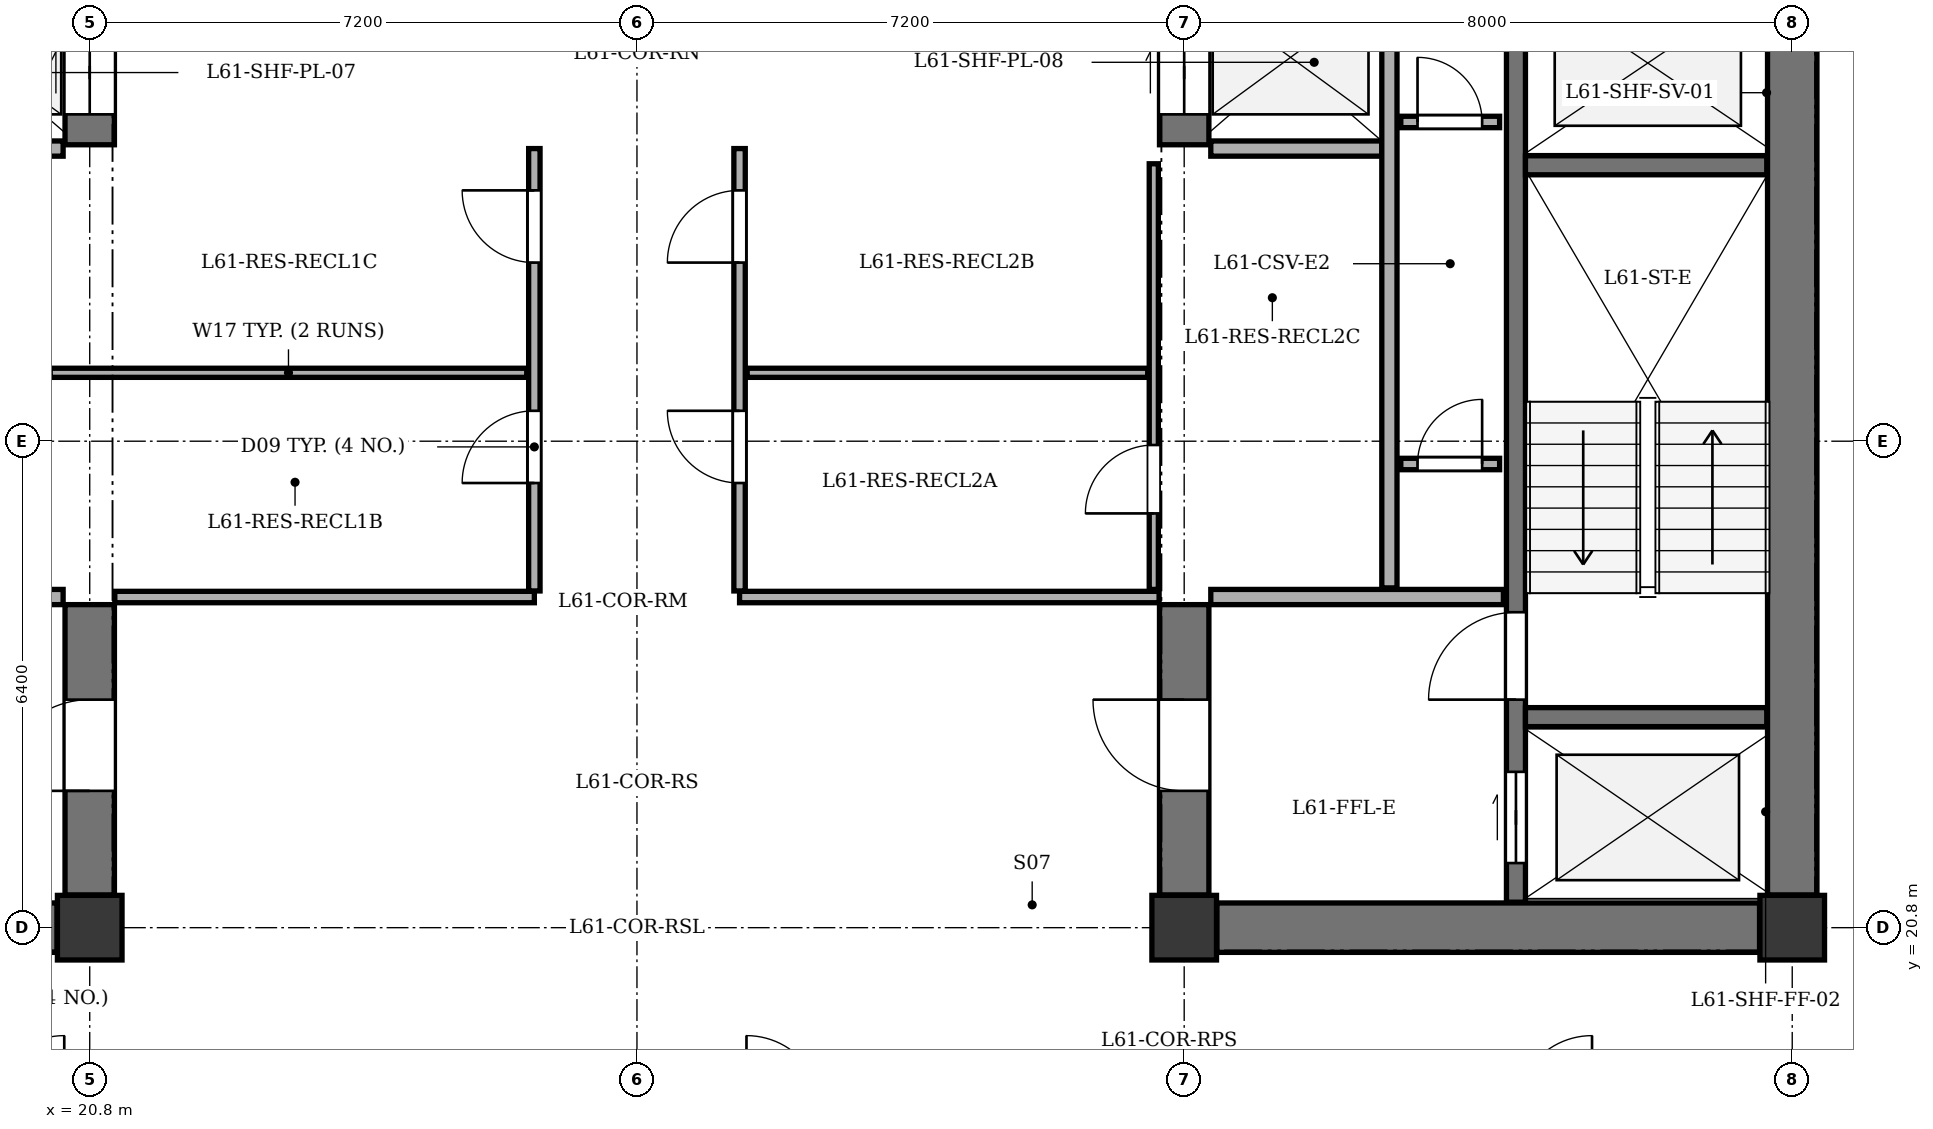
"""IFC4 building model, lengths in metres.
Left out: names, types, materials, properties, quantities, classifications, styles, units other than length and angle.
Written with IfcOpenShell. Run it as: python <this file> out.ifc"""

import sys

from ifc_helpers import new_model, si_unit, direction, frame, frame_2d, origin, origin_2d, place, context, subcontext, project, spatial, rectangle, extrude, element, fill, save


model = new_model("IFC4")
c1 = context("Model", 3, precision=1e-05, world=origin(), true_north=direction((0.0, 1.0)))
c2 = subcontext(c1, "Body", "Model", "MODEL_VIEW")
j1 = project(units=[si_unit("LENGTHUNIT", "METRE"), si_unit("PLANEANGLEUNIT", "RADIAN")], contexts=[c1])
p1 = place(None, origin())
s1 = spatial("IfcSite", under=j1, at=p1, CompositionType="ELEMENT")
p2 = place(p1, origin())
s2 = spatial("IfcBuilding", under=s1, at=p2, CompositionType="ELEMENT")
p3 = place(p2, frame((0.0, 0.0, 234.7)))
s3 = spatial("IfcBuildingStorey", under=s2, at=p3, CompositionType="ELEMENT", Elevation=234.7)
for number, where, z_axis, x_axis in (
    (1, (20.8, 20.8, 0.0), (0.0, 0.0, 1.0), (1.0, 0.0, 0.0)),
    (2, (35.2, 20.8, 0.0), (0.0, 0.0, 1.0), (1.0, 0.0, 0.0)),
    (3, (43.2, 20.8, 0.0), (0.0, 0.0, 1.0), (1.0, 0.0, 0.0)),
):
    element("IfcColumn", number, at=place(p3, frame(where, z_axis=z_axis, x_axis=x_axis)), inside=s3, PredefinedType="COLUMN", context=c2, shape_type="SweptSolid", body=[
        extrude(rectangle(XDim=0.85, YDim=0.85, at=origin_2d()), origin(), (0.0, 0.0, 1.0), 3.4),
    ])
p4 = place(p3, frame((13.23, 20.8, 0.0), z_axis=(0.0, 0.0, 1.0), x_axis=(1.0, 0.0, 0.0)))
e4 = element("IfcWall", 4, at=p4, inside=s3, PredefinedType="SHEAR", context=c2, shape_type="SweptSolid", body=[
    extrude(rectangle(XDim=7.14, YDim=0.65, at=frame_2d((3.57, 0.0))), origin(), (0.0, 0.0, 1.0), 3.1),
])
p5 = place(p3, frame((20.8, 21.23, 0.0), z_axis=(0.0, 0.0, 1.0), x_axis=(0.0, 1.0, 0.0)))
e5 = element("IfcWall", 5, at=p5, inside=s3, PredefinedType="SHEAR", context=c2, shape_type="SweptSolid", body=[
    extrude(rectangle(XDim=3.82, YDim=0.65, at=frame_2d((1.91, 0.0))), origin(), (0.0, 0.0, 1.0), 3.1),
])
p6 = place(p5, frame((1.37, 0.0, 0.0)))
e6 = element("IfcOpeningElement", 6, at=p6, cuts=e5, PredefinedType="OPENING", context=c2, shape_type="SweptSolid", body=[
    extrude(rectangle(XDim=1.2, YDim=2.15, at=frame_2d((0.6, 1.075))), frame((0.0, 0.335, 0.0), z_axis=(0.0, -1.0, 0.0), x_axis=(1.0, 0.0, 0.0)), (0.0, 0.0, 1.0), 0.67),
])
p7 = place(p3, frame((20.8, 31.1, 0.0), z_axis=(0.0, 0.0, 1.0), x_axis=(0.0, 1.0, 0.0)))
e7 = element("IfcWall", 7, at=p7, inside=s3, PredefinedType="SHEAR", context=c2, shape_type="SweptSolid", body=[
    extrude(rectangle(XDim=2.07, YDim=0.65, at=frame_2d((1.035, 0.0))), origin(), (0.0, 0.0, 1.0), 3.1),
])
p8 = place(p7, frame((0.4, 0.0, 0.0)))
e8 = element("IfcOpeningElement", 8, at=p8, cuts=e7, PredefinedType="OPENING", context=c2, shape_type="SweptSolid", body=[
    extrude(rectangle(XDim=1.1, YDim=2.1, at=frame_2d((0.55, 1.05))), frame((0.0, 0.335, 0.0), z_axis=(0.0, -1.0, 0.0), x_axis=(1.0, 0.0, 0.0)), (0.0, 0.0, 1.0), 0.67),
])
for number, where, z_axis, x_axis in (
    (9, (16.6, 25.15, 0.0), (0.0, 0.0, 1.0), (1.0, 0.0, 0.0)),
    (10, (16.6, 31.05, 0.0), (0.0, 0.0, 1.0), (1.0, 0.0, 0.0)),
):
    element("IfcWall", number, at=place(p3, frame(where, z_axis=z_axis, x_axis=x_axis)), inside=s3, PredefinedType="SOLIDWALL", context=c2, shape_type="SweptSolid", body=[
        extrude(rectangle(XDim=3.85, YDim=0.2, at=frame_2d((1.925, 0.0))), origin(), (0.0, 0.0, 1.0), 3.1),
    ])
p9 = place(p3, frame((43.2, 21.23, 0.0), z_axis=(0.0, 0.0, 1.0), x_axis=(0.0, 1.0, 0.0)))
e11 = element("IfcWall", 11, at=p9, inside=s3, PredefinedType="SHEAR", context=c2, shape_type="SweptSolid", body=[
    extrude(rectangle(XDim=11.94, YDim=0.65, at=frame_2d((5.97, 0.0))), origin(), (0.0, 0.0, 1.0), 3.1),
])
p10 = place(p3, frame((35.63, 20.8, 0.0), z_axis=(0.0, 0.0, 1.0), x_axis=(1.0, 0.0, 0.0)))
e12 = element("IfcWall", 12, at=p10, inside=s3, PredefinedType="SHEAR", context=c2, shape_type="SweptSolid", body=[
    extrude(rectangle(XDim=7.14, YDim=0.65, at=frame_2d((3.57, 0.0))), origin(), (0.0, 0.0, 1.0), 3.1),
])
p11 = place(p3, frame((35.2, 21.23, 0.0), z_axis=(0.0, 0.0, 1.0), x_axis=(0.0, 1.0, 0.0)))
e13 = element("IfcWall", 13, at=p11, inside=s3, PredefinedType="SHEAR", context=c2, shape_type="SweptSolid", body=[
    extrude(rectangle(XDim=3.82, YDim=0.65, at=frame_2d((1.91, 0.0))), origin(), (0.0, 0.0, 1.0), 3.1),
])
p12 = place(p11, frame((1.37, 0.0, 0.0)))
e14 = element("IfcOpeningElement", 14, at=p12, cuts=e13, PredefinedType="OPENING", context=c2, shape_type="SweptSolid", body=[
    extrude(rectangle(XDim=1.2, YDim=2.15, at=frame_2d((0.6, 1.075))), frame((0.0, 0.335, 0.0), z_axis=(0.0, -1.0, 0.0), x_axis=(1.0, 0.0, 0.0)), (0.0, 0.0, 1.0), 0.67),
])
p13 = place(p3, frame((35.2, 31.1, 0.0), z_axis=(0.0, 0.0, 1.0), x_axis=(0.0, 1.0, 0.0)))
e15 = element("IfcWall", 15, at=p13, inside=s3, PredefinedType="SHEAR", context=c2, shape_type="SweptSolid", body=[
    extrude(rectangle(XDim=2.07, YDim=0.65, at=frame_2d((1.035, 0.0))), origin(), (0.0, 0.0, 1.0), 3.1),
])
p14 = place(p13, frame((0.4, 0.0, 0.0)))
e16 = element("IfcOpeningElement", 16, at=p14, cuts=e15, PredefinedType="OPENING", context=c2, shape_type="SweptSolid", body=[
    extrude(rectangle(XDim=1.1, YDim=2.1, at=frame_2d((0.55, 1.05))), frame((0.0, 0.335, 0.0), z_axis=(0.0, -1.0, 0.0), x_axis=(1.0, 0.0, 0.0)), (0.0, 0.0, 1.0), 0.67),
])
p15 = place(p3, frame((39.565, 21.135, 0.0), z_axis=(0.0, 0.0, 1.0), x_axis=(0.0, 1.0, 0.0)))
e17 = element("IfcWall", 17, at=p15, inside=s3, PredefinedType="SHEAR", context=c2, shape_type="SweptSolid", body=[
    extrude(rectangle(XDim=12.13, YDim=0.25, at=frame_2d((6.065, 0.0))), origin(), (0.0, 0.0, 1.0), 3.1),
])
p16 = place(p15, frame((0.515, 0.0, 0.0)))
e18 = element("IfcOpeningElement", 18, at=p16, cuts=e17, PredefinedType="OPENING", context=c2, shape_type="SweptSolid", body=[
    extrude(rectangle(XDim=1.2, YDim=2.15, at=frame_2d((0.6, 1.075))), frame((0.0, 0.135, 0.0), z_axis=(0.0, -1.0, 0.0), x_axis=(1.0, 0.0, 0.0)), (0.0, 0.0, 1.0), 0.27),
])
p17 = place(p15, frame((2.665, 0.0, 0.0)))
e19 = element("IfcOpeningElement", 19, at=p17, cuts=e17, PredefinedType="OPENING", context=c2, shape_type="SweptSolid", body=[
    extrude(rectangle(XDim=1.15, YDim=2.15, at=frame_2d((0.575, 1.075))), frame((0.0, 0.135, 0.0), z_axis=(0.0, -1.0, 0.0), x_axis=(1.0, 0.0, 0.0)), (0.0, 0.0, 1.0), 0.27),
])
for number, where, z_axis, x_axis in (
    (20, (39.69, 23.57, 0.0), (0.0, 0.0, 1.0), (1.0, 0.0, 0.0)),
    (21, (39.69, 30.83, 0.0), (0.0, 0.0, 1.0), (1.0, 0.0, 0.0)),
):
    element("IfcWall", number, at=place(p3, frame(where, z_axis=z_axis, x_axis=x_axis)), inside=s3, PredefinedType="SHEAR", context=c2, shape_type="SweptSolid", body=[
        extrude(rectangle(XDim=3.175, YDim=0.25, at=frame_2d((1.587, 0.0))), origin(), (0.0, 0.0, 1.0), 3.1),
    ])
p18 = place(p3, frame((35.55, 25.15, 0.0), z_axis=(0.0, 0.0, 1.0), x_axis=(1.0, 0.0, 0.0)))
e22 = element("IfcWall", 22, at=p18, inside=s3, PredefinedType="SOLIDWALL", context=c2, shape_type="SweptSolid", body=[
    extrude(rectangle(XDim=3.85, YDim=0.2, at=frame_2d((1.925, 0.0))), origin(), (0.0, 0.0, 1.0), 3.1),
])
p19 = place(p3, frame((35.55, 31.05, 0.0), z_axis=(0.0, 0.0, 1.0), x_axis=(1.0, 0.0, 0.0)))
e23 = element("IfcWall", 23, at=p19, inside=s3, PredefinedType="SOLIDWALL", context=c2, shape_type="SweptSolid", body=[
    extrude(rectangle(XDim=2.25, YDim=0.2, at=frame_2d((1.125, 0.0))), origin(), (0.0, 0.0, 1.0), 3.1),
])
p20 = place(p3, frame((37.9, 25.27, 0.0), z_axis=(0.0, 0.0, 1.0), x_axis=(0.0, 1.0, 0.0)))
e24 = element("IfcWall", 24, at=p20, inside=s3, PredefinedType="SOLIDWALL", context=c2, shape_type="SweptSolid", body=[
    extrude(rectangle(XDim=7.995, YDim=0.2, at=frame_2d((3.998, 0.0))), origin(), (0.0, 0.0, 1.0), 3.1),
])
p21 = place(p3, frame((38.05, 26.9, 0.0), z_axis=(0.0, 0.0, 1.0), x_axis=(1.0, 0.0, 0.0)))
e25 = element("IfcWall", 25, at=p21, inside=s3, PredefinedType="PARTITIONING", context=c2, shape_type="SweptSolid", body=[
    extrude(rectangle(XDim=1.3, YDim=0.15, at=frame_2d((0.65, 0.0))), origin(), (0.0, 0.0, 1.0), 3.1),
])
p22 = place(p21, frame((0.22, 0.0, 0.0)))
e26 = element("IfcOpeningElement", 26, at=p22, cuts=e25, PredefinedType="OPENING", context=c2, shape_type="SweptSolid", body=[
    extrude(rectangle(XDim=0.85, YDim=2.02, at=frame_2d((0.425, 1.01))), frame((0.0, 0.085, 0.0), z_axis=(0.0, -1.0, 0.0), x_axis=(1.0, 0.0, 0.0)), (0.0, 0.0, 1.0), 0.17),
])
p23 = place(p3, frame((38.05, 31.4, 0.0), z_axis=(0.0, 0.0, 1.0), x_axis=(1.0, 0.0, 0.0)))
e27 = element("IfcWall", 27, at=p23, inside=s3, PredefinedType="PARTITIONING", context=c2, shape_type="SweptSolid", body=[
    extrude(rectangle(XDim=1.3, YDim=0.15, at=frame_2d((0.65, 0.0))), origin(), (0.0, 0.0, 1.0), 3.1),
])
p24 = place(p23, frame((0.22, 0.0, 0.0)))
e28 = element("IfcOpeningElement", 28, at=p24, cuts=e27, PredefinedType="OPENING", context=c2, shape_type="SweptSolid", body=[
    extrude(rectangle(XDim=0.85, YDim=2.02, at=frame_2d((0.425, 1.01))), frame((0.0, 0.085, 0.0), z_axis=(0.0, -1.0, 0.0), x_axis=(1.0, 0.0, 0.0)), (0.0, 0.0, 1.0), 0.17),
])
for number, where, z_axis, x_axis in (
    (29, (21.13, 25.15, 0.0), (0.0, 0.0, 1.0), (1.0, 0.0, 0.0)),
    (30, (29.35, 25.15, 0.0), (0.0, 0.0, 1.0), (1.0, 0.0, 0.0)),
):
    element("IfcWall", number, at=place(p3, frame(where, z_axis=z_axis, x_axis=x_axis)), inside=s3, PredefinedType="PARTITIONING", context=c2, shape_type="SweptSolid", body=[
        extrude(rectangle(XDim=5.52, YDim=0.15, at=frame_2d((2.76, 0.0))), origin(), (0.0, 0.0, 1.0), 3.1),
    ])
p25 = place(p3, frame((26.65, 25.23, 0.0), z_axis=(0.0, 0.0, 1.0), x_axis=(0.0, 1.0, 0.0)))
e31 = element("IfcWall", 31, at=p25, inside=s3, PredefinedType="PARTITIONING", context=c2, shape_type="SweptSolid", body=[
    extrude(rectangle(XDim=5.82, YDim=0.15, at=frame_2d((2.91, 0.0))), origin(), (0.0, 0.0, 1.0), 3.1),
])
p26 = place(p25, frame((1.42, 0.0, 0.0)))
e32 = element("IfcOpeningElement", 32, at=p26, cuts=e31, PredefinedType="OPENING", context=c2, shape_type="SweptSolid", body=[
    extrude(rectangle(XDim=0.95, YDim=2.1, at=frame_2d((0.475, 1.05))), frame((0.0, 0.085, 0.0), z_axis=(0.0, -1.0, 0.0), x_axis=(1.0, 0.0, 0.0)), (0.0, 0.0, 1.0), 0.17),
])
p27 = place(p25, frame((4.32, 0.0, 0.0)))
e33 = element("IfcOpeningElement", 33, at=p27, cuts=e31, PredefinedType="OPENING", context=c2, shape_type="SweptSolid", body=[
    extrude(rectangle(XDim=0.95, YDim=2.1, at=frame_2d((0.475, 1.05))), frame((0.0, 0.085, 0.0), z_axis=(0.0, -1.0, 0.0), x_axis=(1.0, 0.0, 0.0)), (0.0, 0.0, 1.0), 0.17),
])
p28 = place(p3, frame((20.28, 28.1, 0.0), z_axis=(0.0, 0.0, 1.0), x_axis=(1.0, 0.0, 0.0)))
e34 = element("IfcWall", 34, at=p28, inside=s3, PredefinedType="PARTITIONING", context=c2, shape_type="SweptSolid", body=[
    extrude(rectangle(XDim=6.27, YDim=0.12, at=frame_2d((3.135, 0.0))), origin(), (0.0, 0.0, 1.0), 3.1),
])
p29 = place(p3, frame((29.35, 25.23, 0.0), z_axis=(0.0, 0.0, 1.0), x_axis=(0.0, 1.0, 0.0)))
e35 = element("IfcWall", 35, at=p29, inside=s3, PredefinedType="PARTITIONING", context=c2, shape_type="SweptSolid", body=[
    extrude(rectangle(XDim=5.82, YDim=0.15, at=frame_2d((2.91, 0.0))), origin(), (0.0, 0.0, 1.0), 3.1),
])
p30 = place(p29, frame((1.42, 0.0, 0.0)))
e36 = element("IfcOpeningElement", 36, at=p30, cuts=e35, PredefinedType="OPENING", context=c2, shape_type="SweptSolid", body=[
    extrude(rectangle(XDim=0.95, YDim=2.1, at=frame_2d((0.475, 1.05))), frame((0.0, 0.085, 0.0), z_axis=(0.0, -1.0, 0.0), x_axis=(1.0, 0.0, 0.0)), (0.0, 0.0, 1.0), 0.17),
])
p31 = place(p29, frame((4.32, 0.0, 0.0)))
e37 = element("IfcOpeningElement", 37, at=p31, cuts=e35, PredefinedType="OPENING", context=c2, shape_type="SweptSolid", body=[
    extrude(rectangle(XDim=0.95, YDim=2.1, at=frame_2d((0.475, 1.05))), frame((0.0, 0.085, 0.0), z_axis=(0.0, -1.0, 0.0), x_axis=(1.0, 0.0, 0.0)), (0.0, 0.0, 1.0), 0.17),
])
p32 = place(p3, frame((34.8, 25.25, 0.0), z_axis=(0.0, 0.0, 1.0), x_axis=(0.0, 1.0, 0.0)))
e38 = element("IfcWall", 38, at=p32, inside=s3, PredefinedType="PARTITIONING", context=c2, shape_type="SweptSolid", body=[
    extrude(rectangle(XDim=5.6, YDim=0.12, at=frame_2d((2.8, 0.0))), origin(), (0.0, 0.0, 1.0), 3.1),
])
p33 = place(p32, frame((1.0, 0.0, 0.0)))
e39 = element("IfcOpeningElement", 39, at=p33, cuts=e38, PredefinedType="OPENING", context=c2, shape_type="SweptSolid", body=[
    extrude(rectangle(XDim=0.9, YDim=2.05, at=frame_2d((0.45, 1.025))), frame((0.0, 0.07, 0.0), z_axis=(0.0, -1.0, 0.0), x_axis=(1.0, 0.0, 0.0)), (0.0, 0.0, 1.0), 0.14),
])
p34 = place(p3, frame((29.45, 28.1, 0.0), z_axis=(0.0, 0.0, 1.0), x_axis=(1.0, 0.0, 0.0)))
e40 = element("IfcWall", 40, at=p34, inside=s3, PredefinedType="PARTITIONING", context=c2, shape_type="SweptSolid", body=[
    extrude(rectangle(XDim=5.27, YDim=0.12, at=frame_2d((2.635, 0.0))), origin(), (0.0, 0.0, 1.0), 3.1),
])
p35 = place(p6, origin())
e41 = element("IfcDoor", 41, at=p35, inside=s3, OperationType="SINGLE_SWING_LEFT", PredefinedType="DOOR", context=c2, shape_type="SweptSolid", body=[
    extrude(rectangle(XDim=1.2, YDim=2.15, at=frame_2d((0.6, 1.075))), frame((0.0, 0.025, 0.0), z_axis=(0.0, -1.0, 0.0), x_axis=(1.0, 0.0, 0.0)), (0.0, 0.0, 1.0), 0.05),
])
fill(e6, e41)
p36 = place(p8, origin())
e42 = element("IfcDoor", 42, at=p36, inside=s3, OperationType="DOUBLE_DOOR_SLIDING", PredefinedType="DOOR", context=c2, shape_type="SweptSolid", body=[
    extrude(rectangle(XDim=1.1, YDim=2.1, at=frame_2d((0.55, 1.05))), frame((0.0, 0.025, 0.0), z_axis=(0.0, -1.0, 0.0), x_axis=(1.0, 0.0, 0.0)), (0.0, 0.0, 1.0), 0.05),
])
fill(e8, e42)
p37 = place(p12, origin())
e43 = element("IfcDoor", 43, at=p37, inside=s3, OperationType="SINGLE_SWING_RIGHT", PredefinedType="DOOR", context=c2, shape_type="SweptSolid", body=[
    extrude(rectangle(XDim=1.2, YDim=2.15, at=frame_2d((0.6, 1.075))), frame((0.0, 0.025, 0.0), z_axis=(0.0, -1.0, 0.0), x_axis=(1.0, 0.0, 0.0)), (0.0, 0.0, 1.0), 0.05),
])
fill(e14, e43)
p38 = place(p14, origin())
e44 = element("IfcDoor", 44, at=p38, inside=s3, OperationType="DOUBLE_DOOR_SLIDING", PredefinedType="DOOR", context=c2, shape_type="SweptSolid", body=[
    extrude(rectangle(XDim=1.1, YDim=2.1, at=frame_2d((0.55, 1.05))), frame((0.0, 0.025, 0.0), z_axis=(0.0, -1.0, 0.0), x_axis=(1.0, 0.0, 0.0)), (0.0, 0.0, 1.0), 0.05),
])
fill(e16, e44)
p39 = place(p16, origin())
e45 = element("IfcDoor", 45, at=p39, inside=s3, OperationType="DOUBLE_DOOR_SLIDING", PredefinedType="DOOR", context=c2, shape_type="SweptSolid", body=[
    extrude(rectangle(XDim=1.2, YDim=2.15, at=frame_2d((0.6, 1.075))), frame((0.0, 0.025, 0.0), z_axis=(0.0, -1.0, 0.0), x_axis=(1.0, 0.0, 0.0)), (0.0, 0.0, 1.0), 0.05),
])
fill(e18, e45)
p40 = place(p17, origin())
e46 = element("IfcDoor", 46, at=p40, inside=s3, OperationType="SINGLE_SWING_LEFT", PredefinedType="DOOR", context=c2, shape_type="SweptSolid", body=[
    extrude(rectangle(XDim=1.15, YDim=2.15, at=frame_2d((0.575, 1.075))), frame((0.0, 0.025, 0.0), z_axis=(0.0, -1.0, 0.0), x_axis=(1.0, 0.0, 0.0)), (0.0, 0.0, 1.0), 0.05),
])
fill(e19, e46)
p41 = place(p22, origin())
e47 = element("IfcDoor", 47, at=p41, inside=s3, OperationType="SINGLE_SWING_RIGHT", PredefinedType="DOOR", context=c2, shape_type="SweptSolid", body=[
    extrude(rectangle(XDim=0.85, YDim=2.02, at=frame_2d((0.425, 1.01))), frame((0.0, 0.025, 0.0), z_axis=(0.0, -1.0, 0.0), x_axis=(1.0, 0.0, 0.0)), (0.0, 0.0, 1.0), 0.05),
])
fill(e26, e47)
p42 = place(p24, origin())
e48 = element("IfcDoor", 48, at=p42, inside=s3, OperationType="SINGLE_SWING_LEFT", PredefinedType="DOOR", context=c2, shape_type="SweptSolid", body=[
    extrude(rectangle(XDim=0.85, YDim=2.02, at=frame_2d((0.425, 1.01))), frame((0.0, 0.025, 0.0), z_axis=(0.0, -1.0, 0.0), x_axis=(1.0, 0.0, 0.0)), (0.0, 0.0, 1.0), 0.05),
])
fill(e28, e48)
p43 = place(p26, origin())
e49 = element("IfcDoor", 49, at=p43, inside=s3, OperationType="SINGLE_SWING_LEFT", PredefinedType="DOOR", context=c2, shape_type="SweptSolid", body=[
    extrude(rectangle(XDim=0.95, YDim=2.1, at=frame_2d((0.475, 1.05))), frame((0.0, 0.025, 0.0), z_axis=(0.0, -1.0, 0.0), x_axis=(1.0, 0.0, 0.0)), (0.0, 0.0, 1.0), 0.05),
])
fill(e32, e49)
p44 = place(p27, origin())
e50 = element("IfcDoor", 50, at=p44, inside=s3, OperationType="SINGLE_SWING_RIGHT", PredefinedType="DOOR", context=c2, shape_type="SweptSolid", body=[
    extrude(rectangle(XDim=0.95, YDim=2.1, at=frame_2d((0.475, 1.05))), frame((0.0, 0.025, 0.0), z_axis=(0.0, -1.0, 0.0), x_axis=(1.0, 0.0, 0.0)), (0.0, 0.0, 1.0), 0.05),
])
fill(e33, e50)
p45 = place(p33, origin())
e51 = element("IfcDoor", 51, at=p45, inside=s3, OperationType="SINGLE_SWING_LEFT", PredefinedType="DOOR", context=c2, shape_type="SweptSolid", body=[
    extrude(rectangle(XDim=0.9, YDim=2.05, at=frame_2d((0.45, 1.025))), frame((0.0, 0.025, 0.0), z_axis=(0.0, -1.0, 0.0), x_axis=(1.0, 0.0, 0.0)), (0.0, 0.0, 1.0), 0.05),
])
fill(e39, e51)
p46 = place(p30, origin())
e52 = element("IfcDoor", 52, at=p46, inside=s3, OperationType="SINGLE_SWING_RIGHT", PredefinedType="DOOR", context=c2, shape_type="SweptSolid", body=[
    extrude(rectangle(XDim=0.95, YDim=2.1, at=frame_2d((0.475, 1.05))), frame((0.0, 0.025, 0.0), z_axis=(0.0, -1.0, 0.0), x_axis=(1.0, 0.0, 0.0)), (0.0, 0.0, 1.0), 0.05),
])
fill(e36, e52)
p47 = place(p31, origin())
e53 = element("IfcDoor", 53, at=p47, inside=s3, OperationType="SINGLE_SWING_LEFT", PredefinedType="DOOR", context=c2, shape_type="SweptSolid", body=[
    extrude(rectangle(XDim=0.95, YDim=2.1, at=frame_2d((0.475, 1.05))), frame((0.0, 0.025, 0.0), z_axis=(0.0, -1.0, 0.0), x_axis=(1.0, 0.0, 0.0)), (0.0, 0.0, 1.0), 0.05),
])
fill(e37, e53)
save(model, sys.argv[1])
